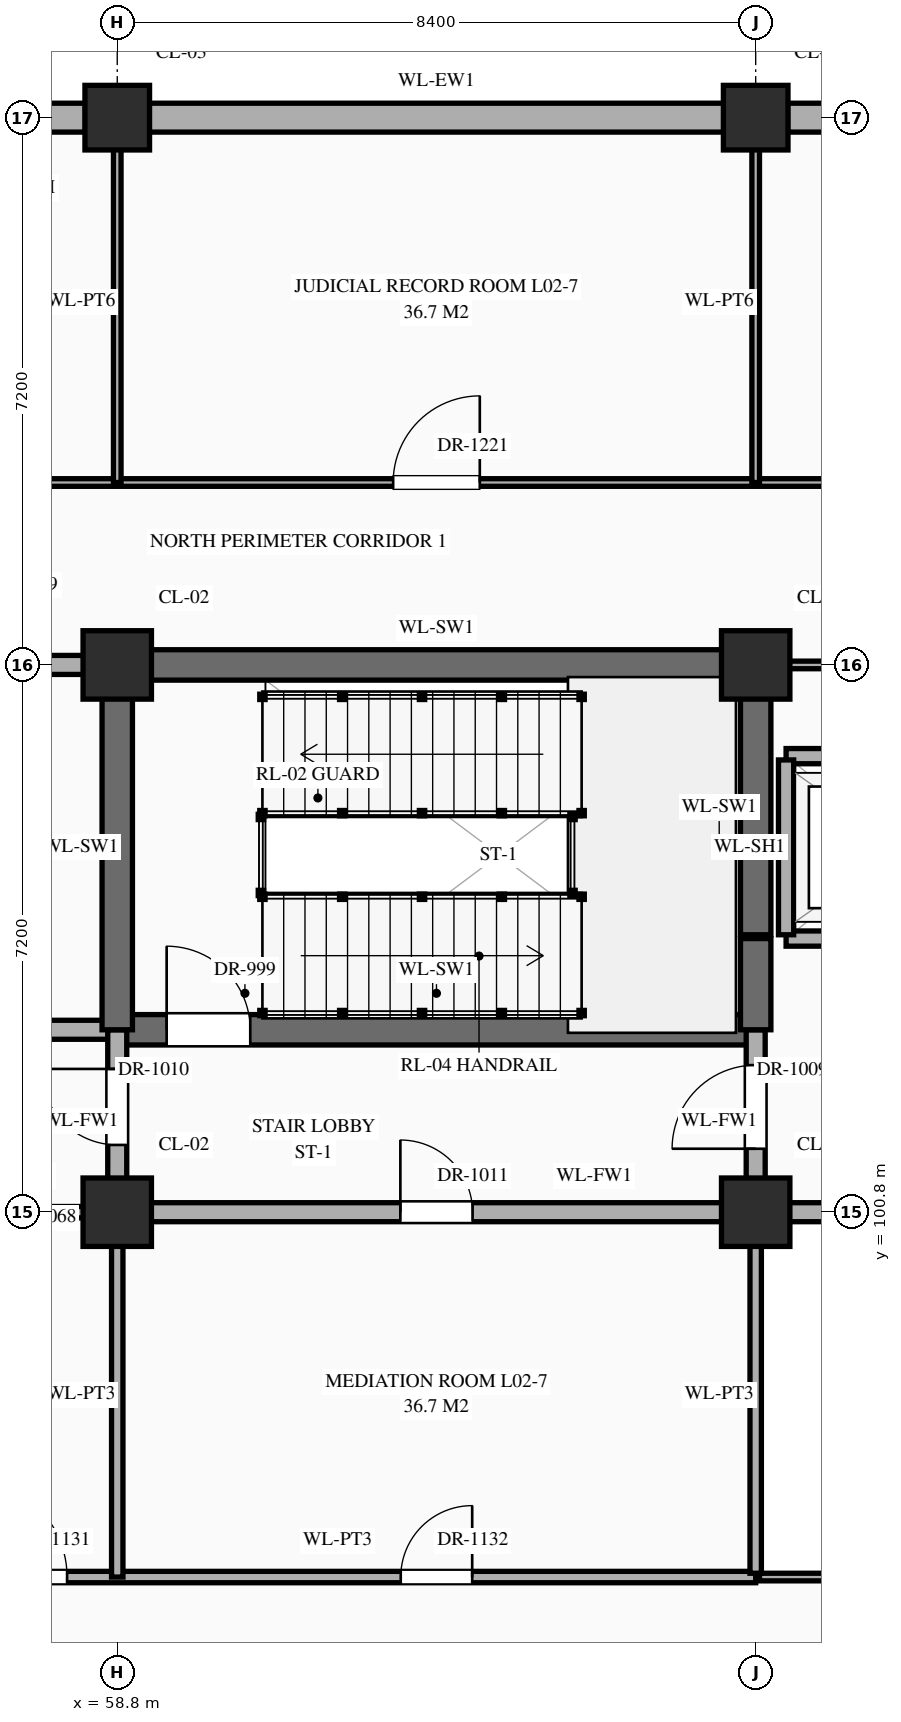
"""IFC4 building model, lengths in metres.
Left out: names, types, materials, properties, quantities, classifications, styles, units other than length and angle.
Written with IfcOpenShell. Run it as: python <this file> out.ifc"""

import sys

from ifc_helpers import new_model, si_unit, direction, frame, frame_2d, origin, origin_2d, place, context, subcontext, project, spatial, rectangle, extrude, element, fill, save


model = new_model("IFC4")
c1 = context("Model", 3, precision=1e-05, world=origin(), true_north=direction((0.0, 1.0)))
c2 = subcontext(c1, "Body", "Model", "MODEL_VIEW")
j1 = project(units=[si_unit("LENGTHUNIT", "METRE"), si_unit("PLANEANGLEUNIT", "RADIAN")], contexts=[c1])
p1 = place(None, origin())
s1 = spatial("IfcSite", under=j1, at=p1, CompositionType="ELEMENT")
p2 = place(p1, origin())
s2 = spatial("IfcBuilding", under=s1, at=p2, CompositionType="ELEMENT")
p3 = place(p2, frame((0.0, 0.0, 5.4)))
s3 = spatial("IfcBuildingStorey", under=s2, at=p3, CompositionType="ELEMENT", Elevation=5.4)
for number, where, z_axis, x_axis in (
    (1, (58.8, 100.8, 0.0), (0.0, 0.0, 1.0), (1.0, 0.0, 0.0)),
    (2, (58.8, 108.0, 0.0), (0.0, 0.0, 1.0), (1.0, 0.0, 0.0)),
):
    element("IfcColumn", number, at=place(p3, frame(where, z_axis=z_axis, x_axis=x_axis)), inside=s3, PredefinedType="COLUMN", context=c2, shape_type="SweptSolid", body=[
        extrude(rectangle(XDim=0.9, YDim=0.9, at=origin_2d()), origin(), (0.0, 0.0, 1.0), 5.4),
    ])
p4 = place(p3, frame((58.8, 115.2, 0.0), z_axis=(0.0, 0.0, 1.0), x_axis=(1.0, 0.0, 0.0)))
e3 = element("IfcColumn", 3, at=p4, inside=s3, PredefinedType="COLUMN", context=c2, shape_type="SweptSolid", body=[
    extrude(rectangle(XDim=0.85, YDim=0.85, at=origin_2d()), origin(), (0.0, 0.0, 1.0), 5.4),
])
for number, where, z_axis, x_axis in (
    (4, (67.2, 100.8, 0.0), (0.0, 0.0, 1.0), (1.0, 0.0, 0.0)),
    (5, (67.2, 108.0, 0.0), (0.0, 0.0, 1.0), (1.0, 0.0, 0.0)),
):
    element("IfcColumn", number, at=place(p3, frame(where, z_axis=z_axis, x_axis=x_axis)), inside=s3, PredefinedType="COLUMN", context=c2, shape_type="SweptSolid", body=[
        extrude(rectangle(XDim=0.9, YDim=0.9, at=origin_2d()), origin(), (0.0, 0.0, 1.0), 5.4),
    ])
p5 = place(p3, frame((67.2, 115.2, 0.0), z_axis=(0.0, 0.0, 1.0), x_axis=(1.0, 0.0, 0.0)))
e6 = element("IfcColumn", 6, at=p5, inside=s3, PredefinedType="COLUMN", context=c2, shape_type="SweptSolid", body=[
    extrude(rectangle(XDim=0.85, YDim=0.85, at=origin_2d()), origin(), (0.0, 0.0, 1.0), 5.4),
])
p6 = place(p3, frame((50.82, 115.2, 0.0), z_axis=(0.0, 0.0, 1.0), x_axis=(1.0, 0.0, 0.0)))
e7 = element("IfcWall", 7, at=p6, inside=s3, PredefinedType="STANDARD", context=c2, shape_type="SweptSolid", body=[
    extrude(rectangle(XDim=7.56, YDim=0.38, at=frame_2d((3.78, 0.0))), origin(), (0.0, 0.0, 1.0), 4.47),
])
p7 = place(p3, frame((59.22, 115.2, 0.0), z_axis=(0.0, 0.0, 1.0), x_axis=(1.0, 0.0, 0.0)))
e8 = element("IfcWall", 8, at=p7, inside=s3, PredefinedType="STANDARD", context=c2, shape_type="SweptSolid", body=[
    extrude(rectangle(XDim=7.56, YDim=0.38, at=frame_2d((3.78, 0.0))), origin(), (0.0, 0.0, 1.0), 4.47),
])
p8 = place(p3, frame((67.62, 115.2, 0.0), z_axis=(0.0, 0.0, 1.0), x_axis=(1.0, 0.0, 0.0)))
e9 = element("IfcWall", 9, at=p8, inside=s3, PredefinedType="STANDARD", context=c2, shape_type="SweptSolid", body=[
    extrude(rectangle(XDim=7.56, YDim=0.38, at=frame_2d((3.78, 0.0))), origin(), (0.0, 0.0, 1.0), 4.47),
])
p9 = place(p3, frame((56.2, 96.0, 0.0), z_axis=(0.0, 0.0, 1.0), x_axis=(1.0, 0.0, 0.0)))
e10 = element("IfcWall", 10, at=p9, inside=s3, PredefinedType="STANDARD", context=c2, shape_type="SweptSolid", body=[
    extrude(rectangle(XDim=11.0, YDim=0.15, at=frame_2d((5.5, 0.0))), origin(), (0.0, 0.0, 1.0), 5.12),
])
p10 = place(p9, frame((0.66, 0.0, 0.0)))
e11 = element("IfcOpeningElement", 11, at=p10, cuts=e10, PredefinedType="OPENING", context=c2, shape_type="SweptSolid", body=[
    extrude(rectangle(XDim=1.28, YDim=2.35, at=frame_2d((0.64, 1.175))), frame((0.0, 0.087, 0.0), z_axis=(0.0, -1.0, 0.0), x_axis=(1.0, 0.0, 0.0)), (0.0, 0.0, 1.0), 0.174),
])
p11 = place(p9, frame((6.33, 0.0, 0.0)))
e12 = element("IfcOpeningElement", 12, at=p11, cuts=e10, PredefinedType="OPENING", context=c2, shape_type="SweptSolid", body=[
    extrude(rectangle(XDim=0.94, YDim=2.3, at=frame_2d((0.47, 1.15))), frame((0.0, 0.087, 0.0), z_axis=(0.0, -1.0, 0.0), x_axis=(1.0, 0.0, 0.0)), (0.0, 0.0, 1.0), 0.174),
])
p12 = place(p3, frame((67.25, 96.0, 0.0), z_axis=(0.0, 0.0, 1.0), x_axis=(1.0, 0.0, 0.0)))
e13 = element("IfcWall", 13, at=p12, inside=s3, PredefinedType="STANDARD", context=c2, shape_type="SweptSolid", body=[
    extrude(rectangle(XDim=16.7, YDim=0.1, at=frame_2d((8.35, 0.0))), origin(), (0.0, 0.0, 1.0), 5.12),
])
p13 = place(p3, frame((56.2, 100.8, 0.0), z_axis=(0.0, 0.0, 1.0), x_axis=(1.0, 0.0, 0.0)))
e14 = element("IfcWall", 14, at=p13, inside=s3, PredefinedType="STANDARD", context=c2, shape_type="SweptSolid", body=[
    extrude(rectangle(XDim=2.6, YDim=0.15, at=frame_2d((1.3, 0.0))), origin(), (0.0, 0.0, 1.0), 4.27),
])
p14 = place(p13, frame((0.545, 0.0, 0.0)))
e15 = element("IfcOpeningElement", 15, at=p14, cuts=e14, PredefinedType="OPENING", context=c2, shape_type="SweptSolid", body=[
    extrude(rectangle(XDim=1.14, YDim=2.4, at=frame_2d((0.57, 1.2))), frame((0.0, 0.087, 0.0), z_axis=(0.0, -1.0, 0.0), x_axis=(1.0, 0.0, 0.0)), (0.0, 0.0, 1.0), 0.174),
])
p15 = place(p3, frame((58.8, 100.8, 0.0), z_axis=(0.0, 0.0, 1.0), x_axis=(1.0, 0.0, 0.0)))
e16 = element("IfcWall", 16, at=p15, inside=s3, PredefinedType="STANDARD", context=c2, shape_type="SweptSolid", body=[
    extrude(rectangle(XDim=8.4, YDim=0.25, at=frame_2d((4.2, 0.0))), origin(), (0.0, 0.0, 1.0), 4.27),
])
p16 = place(p15, frame((3.725, 0.0, 0.0)))
e17 = element("IfcOpeningElement", 17, at=p16, cuts=e16, PredefinedType="OPENING", context=c2, shape_type="SweptSolid", body=[
    extrude(rectangle(XDim=0.95, YDim=2.15, at=frame_2d((0.475, 1.075))), frame((0.0, 0.137, 0.0), z_axis=(0.0, -1.0, 0.0), x_axis=(1.0, 0.0, 0.0)), (0.0, 0.0, 1.0), 0.274),
])
p17 = place(p3, frame((67.25, 100.8, 0.0), z_axis=(0.0, 0.0, 1.0), x_axis=(1.0, 0.0, 0.0)))
e18 = element("IfcWall", 18, at=p17, inside=s3, PredefinedType="STANDARD", context=c2, shape_type="SweptSolid", body=[
    extrude(rectangle(XDim=4.1, YDim=0.25, at=frame_2d((2.05, 0.0))), origin(), (0.0, 0.0, 1.0), 4.27),
])
p18 = place(p3, frame((54.6, 103.2, 0.0), z_axis=(0.0, 0.0, 1.0), x_axis=(1.0, 0.0, 0.0)))
e19 = element("IfcWall", 19, at=p18, inside=s3, PredefinedType="STANDARD", context=c2, shape_type="SweptSolid", body=[
    extrude(rectangle(XDim=4.2, YDim=0.25, at=frame_2d((2.1, 0.0))), origin(), (0.0, 0.0, 1.0), 5.12),
])
p19 = place(p18, frame((1.55, 0.0, 0.0)))
e20 = element("IfcOpeningElement", 20, at=p19, cuts=e19, PredefinedType="OPENING", context=c2, shape_type="SweptSolid", body=[
    extrude(rectangle(XDim=1.1, YDim=2.2, at=frame_2d((0.55, 1.1))), frame((0.0, 0.137, 0.0), z_axis=(0.0, -1.0, 0.0), x_axis=(1.0, 0.0, 0.0)), (0.0, 0.0, 1.0), 0.274),
])
p20 = place(p3, frame((58.8, 103.2, 0.0), z_axis=(0.0, 0.0, 1.0), x_axis=(1.0, 0.0, 0.0)))
e21 = element("IfcWall", 21, at=p20, inside=s3, PredefinedType="SHEAR", context=c2, shape_type="SweptSolid", body=[
    extrude(rectangle(XDim=8.4, YDim=0.4, at=frame_2d((4.2, 0.0))), origin(), (0.0, 0.0, 1.0), 5.12),
])
p21 = place(p20, frame((0.65, 0.0, 0.0)))
e22 = element("IfcOpeningElement", 22, at=p21, cuts=e21, PredefinedType="OPENING", context=c2, shape_type="SweptSolid", body=[
    extrude(rectangle(XDim=1.1, YDim=2.2, at=frame_2d((0.55, 1.1))), frame((0.0, 0.212, 0.0), z_axis=(0.0, -1.0, 0.0), x_axis=(1.0, 0.0, 0.0)), (0.0, 0.0, 1.0), 0.424),
])
p22 = place(p3, frame((67.6, 104.4, 0.0), z_axis=(0.0, 0.0, 1.0), x_axis=(1.0, 0.0, 0.0)))
e23 = element("IfcWall", 23, at=p22, inside=s3, PredefinedType="STANDARD", context=c2, shape_type="SweptSolid", body=[
    extrude(rectangle(XDim=3.0, YDim=0.2, at=frame_2d((1.5, 0.0))), origin(), (0.0, 0.0, 1.0), 5.12),
])
p23 = place(p22, frame((0.9, 0.0, 0.0)))
e24 = element("IfcOpeningElement", 24, at=p23, cuts=e23, PredefinedType="OPENING", context=c2, shape_type="SweptSolid", body=[
    extrude(rectangle(XDim=1.2, YDim=2.15, at=frame_2d((0.6, 1.075))), frame((0.0, 0.112, 0.0), z_axis=(0.0, -1.0, 0.0), x_axis=(1.0, 0.0, 0.0)), (0.0, 0.0, 1.0), 0.224),
])
p24 = place(p3, frame((67.6, 106.8, 0.0), z_axis=(0.0, 0.0, 1.0), x_axis=(1.0, 0.0, 0.0)))
e25 = element("IfcWall", 25, at=p24, inside=s3, PredefinedType="STANDARD", context=c2, shape_type="SweptSolid", body=[
    extrude(rectangle(XDim=3.0, YDim=0.2, at=frame_2d((1.5, 0.0))), origin(), (0.0, 0.0, 1.0), 5.12),
])
p25 = place(p3, frame((54.6, 108.0, 0.0), z_axis=(0.0, 0.0, 1.0), x_axis=(1.0, 0.0, 0.0)))
e26 = element("IfcWall", 26, at=p25, inside=s3, PredefinedType="STANDARD", context=c2, shape_type="SweptSolid", body=[
    extrude(rectangle(XDim=4.2, YDim=0.25, at=frame_2d((2.1, 0.0))), origin(), (0.0, 0.0, 1.0), 4.27),
])
p26 = place(p25, frame((1.365, 0.0, 0.0)))
e27 = element("IfcOpeningElement", 27, at=p26, cuts=e26, PredefinedType="OPENING", context=c2, shape_type="SweptSolid", body=[
    extrude(rectangle(XDim=1.1, YDim=2.2, at=frame_2d((0.55, 1.1))), frame((0.0, 0.137, 0.0), z_axis=(0.0, -1.0, 0.0), x_axis=(1.0, 0.0, 0.0)), (0.0, 0.0, 1.0), 0.274),
])
p27 = place(p3, frame((58.8, 108.0, 0.0), z_axis=(0.0, 0.0, 1.0), x_axis=(1.0, 0.0, 0.0)))
e28 = element("IfcWall", 28, at=p27, inside=s3, PredefinedType="SHEAR", context=c2, shape_type="SweptSolid", body=[
    extrude(rectangle(XDim=8.4, YDim=0.4, at=frame_2d((4.2, 0.0))), origin(), (0.0, 0.0, 1.0), 5.12),
])
p28 = place(p3, frame((67.25, 108.0, 0.0), z_axis=(0.0, 0.0, 1.0), x_axis=(1.0, 0.0, 0.0)))
e29 = element("IfcWall", 29, at=p28, inside=s3, PredefinedType="STANDARD", context=c2, shape_type="SweptSolid", body=[
    extrude(rectangle(XDim=4.1, YDim=0.1, at=frame_2d((2.05, 0.0))), origin(), (0.0, 0.0, 1.0), 4.27),
])
p29 = place(p3, frame((50.44, 110.4, 0.0), z_axis=(0.0, 0.0, 1.0), x_axis=(1.0, 0.0, 0.0)))
e30 = element("IfcWall", 30, at=p29, inside=s3, PredefinedType="STANDARD", context=c2, shape_type="SweptSolid", body=[
    extrude(rectangle(XDim=67.12, YDim=0.1, at=frame_2d((33.56, 0.0))), origin(), (0.0, 0.0, 1.0), 5.12),
])
p30 = place(p29, frame((3.65, 0.0, 0.0)))
e31 = element("IfcOpeningElement", 31, at=p30, cuts=e30, PredefinedType="OPENING", context=c2, shape_type="SweptSolid", body=[
    extrude(rectangle(XDim=1.06, YDim=2.4, at=frame_2d((0.53, 1.2))), frame((0.0, 0.062, 0.0), z_axis=(0.0, -1.0, 0.0), x_axis=(1.0, 0.0, 0.0)), (0.0, 0.0, 1.0), 0.124),
])
p31 = place(p29, frame((11.99, 0.0, 0.0)))
e32 = element("IfcOpeningElement", 32, at=p31, cuts=e30, PredefinedType="OPENING", context=c2, shape_type="SweptSolid", body=[
    extrude(rectangle(XDim=1.14, YDim=2.4, at=frame_2d((0.57, 1.2))), frame((0.0, 0.062, 0.0), z_axis=(0.0, -1.0, 0.0), x_axis=(1.0, 0.0, 0.0)), (0.0, 0.0, 1.0), 0.124),
])
p32 = place(p29, frame((20.51, 0.0, 0.0)))
e33 = element("IfcOpeningElement", 33, at=p32, cuts=e30, PredefinedType="OPENING", context=c2, shape_type="SweptSolid", body=[
    extrude(rectangle(XDim=0.9, YDim=2.15, at=frame_2d((0.45, 1.075))), frame((0.0, 0.062, 0.0), z_axis=(0.0, -1.0, 0.0), x_axis=(1.0, 0.0, 0.0)), (0.0, 0.0, 1.0), 0.124),
])
p33 = place(p29, frame((28.93, 0.0, 0.0)))
e34 = element("IfcOpeningElement", 34, at=p33, cuts=e30, PredefinedType="OPENING", context=c2, shape_type="SweptSolid", body=[
    extrude(rectangle(XDim=0.86, YDim=2.1, at=frame_2d((0.43, 1.05))), frame((0.0, 0.062, 0.0), z_axis=(0.0, -1.0, 0.0), x_axis=(1.0, 0.0, 0.0)), (0.0, 0.0, 1.0), 0.124),
])
p34 = place(p29, frame((37.3, 0.0, 0.0)))
e35 = element("IfcOpeningElement", 35, at=p34, cuts=e30, PredefinedType="OPENING", context=c2, shape_type="SweptSolid", body=[
    extrude(rectangle(XDim=0.92, YDim=2.15, at=frame_2d((0.46, 1.075))), frame((0.0, 0.062, 0.0), z_axis=(0.0, -1.0, 0.0), x_axis=(1.0, 0.0, 0.0)), (0.0, 0.0, 1.0), 0.124),
])
p35 = place(p29, frame((45.68, 0.0, 0.0)))
e36 = element("IfcOpeningElement", 36, at=p35, cuts=e30, PredefinedType="OPENING", context=c2, shape_type="SweptSolid", body=[
    extrude(rectangle(XDim=0.96, YDim=2.2, at=frame_2d((0.48, 1.1))), frame((0.0, 0.062, 0.0), z_axis=(0.0, -1.0, 0.0), x_axis=(1.0, 0.0, 0.0)), (0.0, 0.0, 1.0), 0.124),
])
p36 = place(p29, frame((54.06, 0.0, 0.0)))
e37 = element("IfcOpeningElement", 37, at=p36, cuts=e30, PredefinedType="OPENING", context=c2, shape_type="SweptSolid", body=[
    extrude(rectangle(XDim=1.0, YDim=2.25, at=frame_2d((0.5, 1.125))), frame((0.0, 0.062, 0.0), z_axis=(0.0, -1.0, 0.0), x_axis=(1.0, 0.0, 0.0)), (0.0, 0.0, 1.0), 0.124),
])
p37 = place(p29, frame((62.42, 0.0, 0.0)))
e38 = element("IfcOpeningElement", 38, at=p37, cuts=e30, PredefinedType="OPENING", context=c2, shape_type="SweptSolid", body=[
    extrude(rectangle(XDim=1.04, YDim=2.2, at=frame_2d((0.52, 1.1))), frame((0.0, 0.062, 0.0), z_axis=(0.0, -1.0, 0.0), x_axis=(1.0, 0.0, 0.0)), (0.0, 0.0, 1.0), 0.124),
])
p38 = place(p3, frame((58.8, 96.0, 0.0), z_axis=(0.0, 0.0, 1.0), x_axis=(0.0, 1.0, 0.0)))
e39 = element("IfcWall", 39, at=p38, inside=s3, PredefinedType="STANDARD", context=c2, shape_type="SweptSolid", body=[
    extrude(rectangle(XDim=4.8, YDim=0.15, at=frame_2d((2.4, 0.0))), origin(), (0.0, 0.0, 1.0), 4.37),
])
p39 = place(p3, frame((58.8, 100.8, 0.0), z_axis=(0.0, 0.0, 1.0), x_axis=(0.0, 1.0, 0.0)))
e40 = element("IfcWall", 40, at=p39, inside=s3, PredefinedType="STANDARD", context=c2, shape_type="SweptSolid", body=[
    extrude(rectangle(XDim=2.4, YDim=0.25, at=frame_2d((1.2, 0.0))), origin(), (0.0, 0.0, 1.0), 4.37),
])
p40 = place(p39, frame((0.885, 0.0, 0.0)))
e41 = element("IfcOpeningElement", 41, at=p40, cuts=e40, PredefinedType="OPENING", context=c2, shape_type="SweptSolid", body=[
    extrude(rectangle(XDim=1.0, YDim=2.2, at=frame_2d((0.5, 1.1))), frame((0.0, 0.137, 0.0), z_axis=(0.0, -1.0, 0.0), x_axis=(1.0, 0.0, 0.0)), (0.0, 0.0, 1.0), 0.274),
])
p41 = place(p3, frame((58.8, 103.2, 0.0), z_axis=(0.0, 0.0, 1.0), x_axis=(0.0, 1.0, 0.0)))
e42 = element("IfcWall", 42, at=p41, inside=s3, PredefinedType="SHEAR", context=c2, shape_type="SweptSolid", body=[
    extrude(rectangle(XDim=4.8, YDim=0.4, at=frame_2d((2.4, 0.0))), origin(), (0.0, 0.0, 1.0), 5.12),
])
p42 = place(p3, frame((58.8, 110.4, 0.0), z_axis=(0.0, 0.0, 1.0), x_axis=(0.0, 1.0, 0.0)))
e43 = element("IfcWall", 43, at=p42, inside=s3, PredefinedType="STANDARD", context=c2, shape_type="SweptSolid", body=[
    extrude(rectangle(XDim=4.76, YDim=0.1, at=frame_2d((2.38, 0.0))), origin(), (0.0, 0.0, 1.0), 4.37),
])
p43 = place(p3, frame((67.2, 96.05, 0.0), z_axis=(0.0, 0.0, 1.0), x_axis=(0.0, 1.0, 0.0)))
e44 = element("IfcWall", 44, at=p43, inside=s3, PredefinedType="STANDARD", context=c2, shape_type="SweptSolid", body=[
    extrude(rectangle(XDim=4.7, YDim=0.15, at=frame_2d((2.35, 0.0))), origin(), (0.0, 0.0, 1.0), 4.37),
])
p44 = place(p3, frame((67.2, 100.8, 0.0), z_axis=(0.0, 0.0, 1.0), x_axis=(0.0, 1.0, 0.0)))
e45 = element("IfcWall", 45, at=p44, inside=s3, PredefinedType="STANDARD", context=c2, shape_type="SweptSolid", body=[
    extrude(rectangle(XDim=2.4, YDim=0.25, at=frame_2d((1.2, 0.0))), origin(), (0.0, 0.0, 1.0), 4.37),
])
p45 = place(p44, frame((0.835, 0.0, 0.0)))
e46 = element("IfcOpeningElement", 46, at=p45, cuts=e45, PredefinedType="OPENING", context=c2, shape_type="SweptSolid", body=[
    extrude(rectangle(XDim=1.1, YDim=2.2, at=frame_2d((0.55, 1.1))), frame((0.0, 0.137, 0.0), z_axis=(0.0, -1.0, 0.0), x_axis=(1.0, 0.0, 0.0)), (0.0, 0.0, 1.0), 0.274),
])
p46 = place(p3, frame((67.2, 103.2, 0.0), z_axis=(0.0, 0.0, 1.0), x_axis=(0.0, 1.0, 0.0)))
e47 = element("IfcWall", 47, at=p46, inside=s3, PredefinedType="SHEAR", context=c2, shape_type="SweptSolid", body=[
    extrude(rectangle(XDim=1.2, YDim=0.4, at=frame_2d((0.6, 0.0))), origin(), (0.0, 0.0, 1.0), 5.12),
])
p47 = place(p3, frame((67.2, 104.45, 0.0), z_axis=(0.0, 0.0, 1.0), x_axis=(0.0, 1.0, 0.0)))
e48 = element("IfcWall", 48, at=p47, inside=s3, PredefinedType="SHEAR", context=c2, shape_type="SweptSolid", body=[
    extrude(rectangle(XDim=3.5, YDim=0.4, at=frame_2d((1.75, 0.0))), origin(), (0.0, 0.0, 1.0), 5.12),
])
p48 = place(p3, frame((67.2, 110.4, 0.0), z_axis=(0.0, 0.0, 1.0), x_axis=(0.0, 1.0, 0.0)))
e49 = element("IfcWall", 49, at=p48, inside=s3, PredefinedType="STANDARD", context=c2, shape_type="SweptSolid", body=[
    extrude(rectangle(XDim=4.76, YDim=0.1, at=frame_2d((2.38, 0.0))), origin(), (0.0, 0.0, 1.0), 4.37),
])
p49 = place(p3, frame((67.6, 104.45, 0.0), z_axis=(0.0, 0.0, 1.0), x_axis=(0.0, 1.0, 0.0)))
e50 = element("IfcWall", 50, at=p49, inside=s3, PredefinedType="STANDARD", context=c2, shape_type="SweptSolid", body=[
    extrude(rectangle(XDim=2.3, YDim=0.2, at=frame_2d((1.15, 0.0))), origin(), (0.0, 0.0, 1.0), 5.12),
])
p50 = place(p21, origin())
e51 = element("IfcDoor", 51, at=p50, inside=s3, OperationType="SINGLE_SWING_LEFT", PredefinedType="DOOR", context=c2, shape_type="SweptSolid", body=[
    extrude(rectangle(XDim=1.1, YDim=2.2, at=frame_2d((0.55, 1.1))), frame((0.0, 0.025, 0.0), z_axis=(0.0, -1.0, 0.0), x_axis=(1.0, 0.0, 0.0)), (0.0, 0.0, 1.0), 0.05),
])
fill(e22, e51)
p51 = place(p45, origin())
e52 = element("IfcDoor", 52, at=p51, inside=s3, OperationType="SINGLE_SWING_LEFT", PredefinedType="DOOR", context=c2, shape_type="SweptSolid", body=[
    extrude(rectangle(XDim=1.1, YDim=2.2, at=frame_2d((0.55, 1.1))), frame((0.0, 0.025, 0.0), z_axis=(0.0, -1.0, 0.0), x_axis=(1.0, 0.0, 0.0)), (0.0, 0.0, 1.0), 0.05),
])
fill(e46, e52)
p52 = place(p40, origin())
e53 = element("IfcDoor", 53, at=p52, inside=s3, OperationType="SINGLE_SWING_RIGHT", PredefinedType="DOOR", context=c2, shape_type="SweptSolid", body=[
    extrude(rectangle(XDim=1.0, YDim=2.2, at=frame_2d((0.5, 1.1))), frame((0.0, 0.025, 0.0), z_axis=(0.0, -1.0, 0.0), x_axis=(1.0, 0.0, 0.0)), (0.0, 0.0, 1.0), 0.05),
])
fill(e41, e53)
p53 = place(p16, origin())
e54 = element("IfcDoor", 54, at=p53, inside=s3, OperationType="SINGLE_SWING_LEFT", PredefinedType="DOOR", context=c2, shape_type="SweptSolid", body=[
    extrude(rectangle(XDim=0.95, YDim=2.15, at=frame_2d((0.475, 1.075))), frame((0.0, 0.025, 0.0), z_axis=(0.0, -1.0, 0.0), x_axis=(1.0, 0.0, 0.0)), (0.0, 0.0, 1.0), 0.05),
])
fill(e17, e54)
p54 = place(p10, origin())
e55 = element("IfcDoor", 55, at=p54, inside=s3, OperationType="SINGLE_SWING_LEFT", PredefinedType="DOOR", context=c2, shape_type="SweptSolid", body=[
    extrude(rectangle(XDim=1.28, YDim=2.35, at=frame_2d((0.64, 1.175))), frame((0.0, 0.025, 0.0), z_axis=(0.0, -1.0, 0.0), x_axis=(1.0, 0.0, 0.0)), (0.0, 0.0, 1.0), 0.05),
])
fill(e11, e55)
p55 = place(p11, origin())
e56 = element("IfcDoor", 56, at=p55, inside=s3, OperationType="SINGLE_SWING_RIGHT", PredefinedType="DOOR", context=c2, shape_type="SweptSolid", body=[
    extrude(rectangle(XDim=0.94, YDim=2.3, at=frame_2d((0.47, 1.15))), frame((0.0, 0.025, 0.0), z_axis=(0.0, -1.0, 0.0), x_axis=(1.0, 0.0, 0.0)), (0.0, 0.0, 1.0), 0.05),
])
fill(e12, e56)
p56 = place(p31, origin())
e57 = element("IfcDoor", 57, at=p56, inside=s3, OperationType="SINGLE_SWING_RIGHT", PredefinedType="DOOR", context=c2, shape_type="SweptSolid", body=[
    extrude(rectangle(XDim=1.14, YDim=2.4, at=frame_2d((0.57, 1.2))), frame((0.0, 0.025, 0.0), z_axis=(0.0, -1.0, 0.0), x_axis=(1.0, 0.0, 0.0)), (0.0, 0.0, 1.0), 0.05),
])
fill(e32, e57)
save(model, sys.argv[1])
